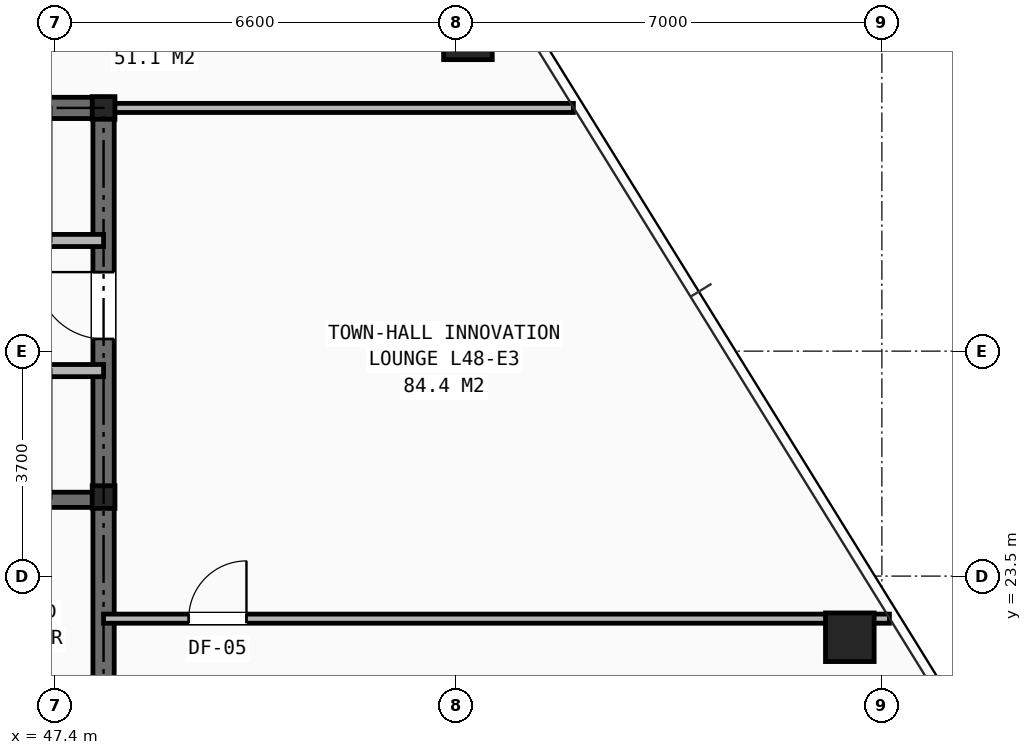
"""IFC4 building model, lengths in metres.
Left out: names, types, materials, properties, quantities, classifications, styles, units other than length and angle.
Written with IfcOpenShell. Run it as: python <this file> out.ifc"""

import sys

from ifc_helpers import new_model, si_unit, direction, frame, frame_2d, origin, origin_2d, place, context, subcontext, project, spatial, rectangle, hollow_rectangle, i_section, extrude, element, fill, save


model = new_model("IFC4")
c1 = context("Model", 3, precision=1e-05, world=origin(), true_north=direction((0.0, 1.0)))
c2 = subcontext(c1, "Body", "Model", "MODEL_VIEW")
j1 = project(units=[si_unit("LENGTHUNIT", "METRE"), si_unit("PLANEANGLEUNIT", "RADIAN")], contexts=[c1])
p1 = place(None, origin())
s1 = spatial("IfcSite", under=j1, at=p1, CompositionType="ELEMENT")
p2 = place(p1, origin())
s2 = spatial("IfcBuilding", under=s1, at=p2, CompositionType="ELEMENT")
p3 = place(p2, frame((0.0, 0.0, 168.9)))
s3 = spatial("IfcBuildingStorey", under=s2, at=p3, CompositionType="ELEMENT", Elevation=168.9)
for number, where, z_axis, x_axis in (
    (1, (48.2, 24.8, 0.0), (0.0, 0.0, 1.0), (1.0, 0.0, 0.0)),
    (2, (48.2, 31.2, 0.0), (0.0, 0.0, 1.0), (1.0, 0.0, 0.0)),
):
    element("IfcColumn", number, at=place(p3, frame(where, z_axis=z_axis, x_axis=x_axis)), inside=s3, PredefinedType="COLUMN", context=c2, shape_type="SweptSolid", body=[
        extrude(i_section(OverallWidth=0.374, OverallDepth=0.372, WebThickness=0.016, FlangeThickness=0.026, at=origin_2d()), origin(), (0.0, 0.0, 1.0), 3.45),
    ])
for number, where, z_axis, x_axis in (
    (3, (60.473, 22.494, 0.0), (0.0, 0.0, 1.0), (1.0, 0.0, 0.0)),
    (4, (54.192, 32.394, 0.0), (0.0, 0.0, 1.0), (1.0, 0.0, 0.0)),
):
    element("IfcColumn", number, at=place(p3, frame(where, z_axis=z_axis, x_axis=x_axis)), inside=s3, PredefinedType="COLUMN", context=c2, shape_type="SweptSolid", body=[
        extrude(hollow_rectangle(XDim=0.8, YDim=0.8, WallThickness=0.055, at=origin_2d()), origin(), (0.0, 0.0, 1.0), 3.45),
    ])
p4 = place(p3, frame((31.8, 31.2, 0.0), z_axis=(0.0, 0.0, 1.0), x_axis=(1.0, 0.0, 0.0)))
e5 = element("IfcWall", 5, at=p4, inside=s3, PredefinedType="SHEAR", context=c2, shape_type="SweptSolid", body=[
    extrude(rectangle(XDim=16.4, YDim=0.35, at=frame_2d((8.2, 0.0))), origin(), (0.0, 0.0, 1.0), 3.21),
])
p5 = place(p3, frame((48.2, 16.4, 0.0), z_axis=(0.0, 0.0, 1.0), x_axis=(0.0, 1.0, 0.0)))
e6 = element("IfcWall", 6, at=p5, inside=s3, PredefinedType="SHEAR", context=c2, shape_type="SweptSolid", body=[
    extrude(rectangle(XDim=14.8, YDim=0.35, at=frame_2d((7.4, 0.0))), origin(), (0.0, 0.0, 1.0), 3.21),
])
p6 = place(p5, frame((11.0, 0.0, 0.0)))
e7 = element("IfcOpeningElement", 7, at=p6, cuts=e6, PredefinedType="OPENING", context=c2, shape_type="SweptSolid", body=[
    extrude(rectangle(XDim=1.1, YDim=2.15, at=frame_2d((0.55, 1.075))), frame((0.0, 0.185, 0.0), z_axis=(0.0, -1.0, 0.0), x_axis=(1.0, 0.0, 0.0)), (0.0, 0.0, 1.0), 0.37),
])
p7 = place(p3, frame((44.955, 24.755, 0.0), z_axis=(0.0, 0.0, 1.0), x_axis=(1.0, 0.0, 0.0)))
e8 = element("IfcWall", 8, at=p7, inside=s3, PredefinedType="SHEAR", context=c2, shape_type="SweptSolid", body=[
    extrude(rectangle(XDim=3.245, YDim=0.25, at=frame_2d((1.623, 0.0))), origin(), (0.0, 0.0, 1.0), 3.21),
])
p8 = place(p3, frame((33.82, 29.02, 0.0), z_axis=(0.0, 0.0, 1.0), x_axis=(1.0, 0.0, 0.0)))
e9 = element("IfcWall", 9, at=p8, inside=s3, PredefinedType="SOLIDWALL", context=c2, shape_type="SweptSolid", body=[
    extrude(rectangle(XDim=14.38, YDim=0.2, at=frame_2d((7.19, 0.0))), origin(), (0.0, 0.0, 1.0), 2.665),
])
p9 = place(p8, frame((3.92, 0.0, 0.0)))
e10 = element("IfcOpeningElement", 10, at=p9, cuts=e9, PredefinedType="OPENING", context=c2, shape_type="SweptSolid", body=[
    extrude(rectangle(XDim=0.9, YDim=2.1, at=frame_2d((0.45, 1.05))), frame((0.0, 0.11, 0.0), z_axis=(0.0, -1.0, 0.0), x_axis=(1.0, 0.0, 0.0)), (0.0, 0.0, 1.0), 0.22),
])
p10 = place(p3, frame((33.82, 26.88, 0.0), z_axis=(0.0, 0.0, 1.0), x_axis=(1.0, 0.0, 0.0)))
e11 = element("IfcWall", 11, at=p10, inside=s3, PredefinedType="SOLIDWALL", context=c2, shape_type="SweptSolid", body=[
    extrude(rectangle(XDim=14.38, YDim=0.2, at=frame_2d((7.19, 0.0))), origin(), (0.0, 0.0, 1.0), 2.665),
])
p11 = place(p10, frame((0.53, 0.0, 0.0)))
e12 = element("IfcOpeningElement", 12, at=p11, cuts=e11, PredefinedType="OPENING", context=c2, shape_type="SweptSolid", body=[
    extrude(rectangle(XDim=1.1, YDim=2.15, at=frame_2d((0.55, 1.075))), frame((0.0, 0.11, 0.0), z_axis=(0.0, -1.0, 0.0), x_axis=(1.0, 0.0, 0.0)), (0.0, 0.0, 1.0), 0.22),
])
p12 = place(p10, frame((2.69, 0.0, 0.0)))
e13 = element("IfcOpeningElement", 13, at=p12, cuts=e11, PredefinedType="OPENING", context=c2, shape_type="SweptSolid", body=[
    extrude(rectangle(XDim=1.1, YDim=2.15, at=frame_2d((0.55, 1.075))), frame((0.0, 0.11, 0.0), z_axis=(0.0, -1.0, 0.0), x_axis=(1.0, 0.0, 0.0)), (0.0, 0.0, 1.0), 0.22),
])
p13 = place(p10, frame((4.85, 0.0, 0.0)))
e14 = element("IfcOpeningElement", 14, at=p13, cuts=e11, PredefinedType="OPENING", context=c2, shape_type="SweptSolid", body=[
    extrude(rectangle(XDim=1.1, YDim=2.15, at=frame_2d((0.55, 1.075))), frame((0.0, 0.11, 0.0), z_axis=(0.0, -1.0, 0.0), x_axis=(1.0, 0.0, 0.0)), (0.0, 0.0, 1.0), 0.22),
])
p14 = place(p10, frame((7.01, 0.0, 0.0)))
e15 = element("IfcOpeningElement", 15, at=p14, cuts=e11, PredefinedType="OPENING", context=c2, shape_type="SweptSolid", body=[
    extrude(rectangle(XDim=1.1, YDim=2.15, at=frame_2d((0.55, 1.075))), frame((0.0, 0.11, 0.0), z_axis=(0.0, -1.0, 0.0), x_axis=(1.0, 0.0, 0.0)), (0.0, 0.0, 1.0), 0.22),
])
p15 = place(p3, frame((48.2, 31.2, 0.0), z_axis=(0.0, 0.0, 1.0), x_axis=(1.0, 0.0, 0.0)))
e16 = element("IfcWall", 16, at=p15, inside=s3, PredefinedType="PARTITIONING", context=c2, shape_type="SweptSolid", body=[
    extrude(rectangle(XDim=7.727, YDim=0.15, at=frame_2d((3.863, 0.0))), origin(), (0.0, 0.0, 1.0), 2.225),
])
p16 = place(p3, frame((48.2, 22.8, 0.0), z_axis=(0.0, 0.0, 1.0), x_axis=(1.0, 0.0, 0.0)))
e17 = element("IfcWall", 17, at=p16, inside=s3, PredefinedType="PARTITIONING", context=c2, shape_type="SweptSolid", body=[
    extrude(rectangle(XDim=12.924, YDim=0.15, at=frame_2d((6.462, 0.0))), origin(), (0.0, 0.0, 1.0), 2.589),
])
p17 = place(p16, frame((1.4, 0.0, 0.0)))
e18 = element("IfcOpeningElement", 18, at=p17, cuts=e17, PredefinedType="OPENING", context=c2, shape_type="SweptSolid", body=[
    extrude(rectangle(XDim=0.95, YDim=2.1, at=frame_2d((0.475, 1.05))), frame((0.0, 0.085, 0.0), z_axis=(0.0, -1.0, 0.0), x_axis=(1.0, 0.0, 0.0)), (0.0, 0.0, 1.0), 0.17),
])
p18 = place(p6, origin())
e19 = element("IfcDoor", 19, at=p18, inside=s3, OperationType="SINGLE_SWING_RIGHT", PredefinedType="DOOR", context=c2, shape_type="SweptSolid", body=[
    extrude(rectangle(XDim=1.1, YDim=2.15, at=frame_2d((0.55, 1.075))), frame((0.0, 0.025, 0.0), z_axis=(0.0, -1.0, 0.0), x_axis=(1.0, 0.0, 0.0)), (0.0, 0.0, 1.0), 0.05),
])
fill(e7, e19)
p19 = place(p17, origin())
e20 = element("IfcDoor", 20, at=p19, inside=s3, OperationType="SINGLE_SWING_RIGHT", PredefinedType="DOOR", context=c2, shape_type="SweptSolid", body=[
    extrude(rectangle(XDim=0.95, YDim=2.1, at=frame_2d((0.475, 1.05))), frame((0.0, 0.025, 0.0), z_axis=(0.0, -1.0, 0.0), x_axis=(1.0, 0.0, 0.0)), (0.0, 0.0, 1.0), 0.05),
])
fill(e18, e20)
save(model, sys.argv[1])
